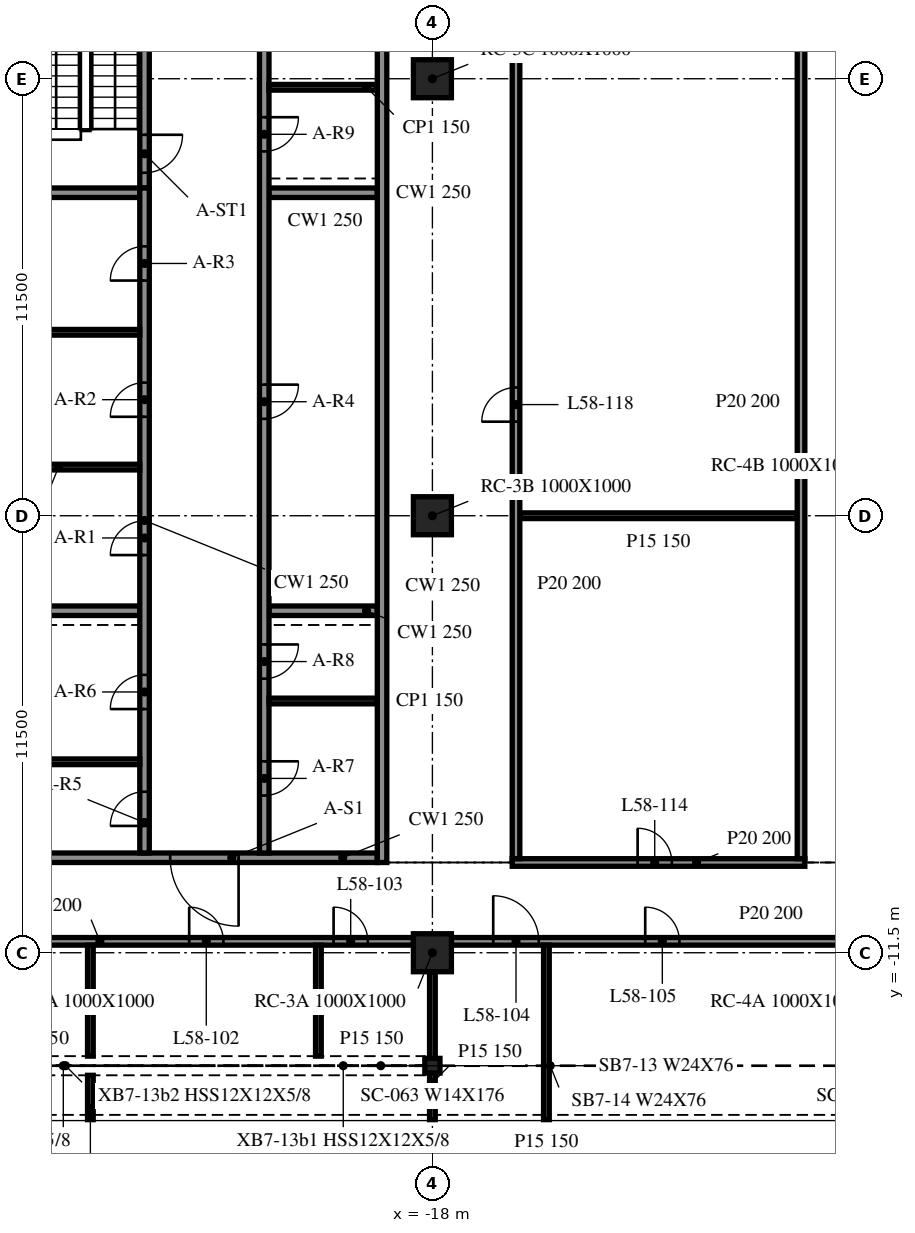
"""IFC4 building model, lengths in metres.
Left out: names, types, materials, properties, quantities, classifications, styles, units other than length and angle.
Written with IfcOpenShell. Run it as: python <this file> out.ifc"""

import sys

from ifc_helpers import new_model, si_unit, direction, frame, frame_2d, origin, origin_2d, place, context, subcontext, project, spatial, rectangle, i_section, extrude, element, fill, save


model = new_model("IFC4")
c1 = context("Model", 3, precision=1e-05, world=origin(), true_north=direction((0.0, 1.0)))
c2 = subcontext(c1, "Body", "Model", "MODEL_VIEW")
j1 = project(units=[si_unit("LENGTHUNIT", "METRE"), si_unit("PLANEANGLEUNIT", "RADIAN")], contexts=[c1])
p1 = place(None, origin())
s1 = spatial("IfcSite", under=j1, at=p1, CompositionType="ELEMENT")
p2 = place(p1, origin())
s2 = spatial("IfcBuilding", under=s1, at=p2, CompositionType="ELEMENT")
p3 = place(p2, frame((0.0, 0.0, 240.0)))
s3 = spatial("IfcBuildingStorey", under=s2, at=p3, CompositionType="ELEMENT", Elevation=240.0)
for number, where, z_axis, x_axis in (
    (1, (-18.0, -11.5, -0.34), (0.0, 0.0, 1.0), (1.0, 0.0, 0.0)),
    (2, (-18.0, 0.0, -0.34), (0.0, 0.0, 1.0), (1.0, 0.0, 0.0)),
    (3, (-18.0, 11.5, -0.34), (0.0, 0.0, 1.0), (1.0, 0.0, 0.0)),
):
    element("IfcColumn", number, at=place(p3, frame(where, z_axis=z_axis, x_axis=x_axis)), inside=s3, PredefinedType="COLUMN", context=c2, shape_type="SweptSolid", body=[
        extrude(rectangle(XDim=1.0, YDim=1.0, at=origin_2d()), origin(), (0.0, 0.0, 1.0), 3.8),
    ])
p4 = place(p3, frame((-18.0, -14.473, -0.34), z_axis=(0.0, 0.0, 1.0), x_axis=(1.0, 0.0, 0.0)))
e4 = element("IfcColumn", 4, at=p4, inside=s3, PredefinedType="COLUMN", context=c2, shape_type="SweptSolid", body=[
    extrude(i_section(OverallWidth=0.399, OverallDepth=0.386, WebThickness=0.021, FlangeThickness=0.033, at=origin_2d()), origin(), (0.0, 0.0, 1.0), 3.8),
])
p5 = place(p3, frame((-19.325, -9.125, 0.0), z_axis=(0.0, 0.0, 1.0), x_axis=(0.0, 1.0, 0.0)))
e5 = element("IfcWall", 5, at=p5, inside=s3, PredefinedType="SOLIDWALL", context=c2, shape_type="SweptSolid", body=[
    extrude(rectangle(XDim=24.25, YDim=0.25, at=frame_2d((12.125, 0.0))), origin(), (0.0, 0.0, 1.0), 3.46),
])
p6 = place(p3, frame((-19.45, -9.0, 0.0), z_axis=(0.0, 0.0, 1.0), x_axis=(-1.0, 0.0, 0.0)))
e6 = element("IfcWall", 6, at=p6, inside=s3, PredefinedType="SOLIDWALL", context=c2, shape_type="SweptSolid", body=[
    extrude(rectangle(XDim=9.1, YDim=0.25, at=frame_2d((4.55, 0.0))), origin(), (0.0, 0.0, 1.0), 3.46),
])
p7 = place(p6, frame((3.65, 0.0, 0.0)))
e7 = element("IfcOpeningElement", 7, at=p7, cuts=e6, PredefinedType="OPENING", context=c2, shape_type="SweptSolid", body=[
    extrude(rectangle(XDim=1.8, YDim=2.1, at=frame_2d((0.9, 1.05))), frame((0.0, 0.135, 0.0), z_axis=(0.0, -1.0, 0.0), x_axis=(1.0, 0.0, 0.0)), (0.0, 0.0, 1.0), 0.27),
])
p8 = place(p3, frame((-25.575, -8.875, 0.0), z_axis=(0.0, 0.0, 1.0), x_axis=(0.0, 1.0, 0.0)))
e8 = element("IfcWall", 8, at=p8, inside=s3, PredefinedType="SOLIDWALL", context=c2, shape_type="SweptSolid", body=[
    extrude(rectangle(XDim=17.5, YDim=0.25, at=frame_2d((8.75, 0.0))), origin(), (0.0, 0.0, 1.0), 3.46),
])
p9 = place(p8, frame((7.84, 0.0, 0.0)))
e9 = element("IfcOpeningElement", 9, at=p9, cuts=e8, PredefinedType="OPENING", context=c2, shape_type="SweptSolid", body=[
    extrude(rectangle(XDim=0.9, YDim=2.1, at=frame_2d((0.45, 1.05))), frame((0.0, 0.135, 0.0), z_axis=(0.0, -1.0, 0.0), x_axis=(1.0, 0.0, 0.0)), (0.0, 0.0, 1.0), 0.27),
])
p10 = place(p8, frame((11.479, 0.0, 0.0)))
e10 = element("IfcOpeningElement", 10, at=p10, cuts=e8, PredefinedType="OPENING", context=c2, shape_type="SweptSolid", body=[
    extrude(rectangle(XDim=0.9, YDim=2.1, at=frame_2d((0.45, 1.05))), frame((0.0, 0.135, 0.0), z_axis=(0.0, -1.0, 0.0), x_axis=(1.0, 0.0, 0.0)), (0.0, 0.0, 1.0), 0.27),
])
p11 = place(p8, frame((15.064, 0.0, 0.0)))
e11 = element("IfcOpeningElement", 11, at=p11, cuts=e8, PredefinedType="OPENING", context=c2, shape_type="SweptSolid", body=[
    extrude(rectangle(XDim=0.9, YDim=2.1, at=frame_2d((0.45, 1.05))), frame((0.0, 0.135, 0.0), z_axis=(0.0, -1.0, 0.0), x_axis=(1.0, 0.0, 0.0)), (0.0, 0.0, 1.0), 0.27),
])
p12 = place(p8, frame((0.712, 0.0, 0.0)))
e12 = element("IfcOpeningElement", 12, at=p12, cuts=e8, PredefinedType="OPENING", context=c2, shape_type="SweptSolid", body=[
    extrude(rectangle(XDim=0.9, YDim=2.1, at=frame_2d((0.45, 1.05))), frame((0.0, 0.135, 0.0), z_axis=(0.0, -1.0, 0.0), x_axis=(1.0, 0.0, 0.0)), (0.0, 0.0, 1.0), 0.27),
])
p13 = place(p8, frame((3.788, 0.0, 0.0)))
e13 = element("IfcOpeningElement", 13, at=p13, cuts=e8, PredefinedType="OPENING", context=c2, shape_type="SweptSolid", body=[
    extrude(rectangle(XDim=0.9, YDim=2.1, at=frame_2d((0.45, 1.05))), frame((0.0, 0.135, 0.0), z_axis=(0.0, -1.0, 0.0), x_axis=(1.0, 0.0, 0.0)), (0.0, 0.0, 1.0), 0.27),
])
p14 = place(p3, frame((-25.575, 14.875, 0.0), z_axis=(0.0, 0.0, 1.0), x_axis=(0.0, -1.0, 0.0)))
e14 = element("IfcWall", 14, at=p14, inside=s3, PredefinedType="SOLIDWALL", context=c2, shape_type="SweptSolid", body=[
    extrude(rectangle(XDim=6.25, YDim=0.25, at=frame_2d((3.125, 0.0))), origin(), (0.0, 0.0, 1.0), 3.46),
])
p15 = place(p14, frame((4.85, 0.0, 0.0)))
e15 = element("IfcOpeningElement", 15, at=p15, cuts=e14, PredefinedType="OPENING", context=c2, shape_type="SweptSolid", body=[
    extrude(rectangle(XDim=1.0, YDim=2.1, at=frame_2d((0.5, 1.05))), frame((0.0, 0.135, 0.0), z_axis=(0.0, -1.0, 0.0), x_axis=(1.0, 0.0, 0.0)), (0.0, 0.0, 1.0), 0.27),
])
p16 = place(p3, frame((-22.425, 14.875, 0.0), z_axis=(0.0, 0.0, 1.0), x_axis=(0.0, -1.0, 0.0)))
e16 = element("IfcWall", 16, at=p16, inside=s3, PredefinedType="SOLIDWALL", context=c2, shape_type="SweptSolid", body=[
    extrude(rectangle(XDim=23.75, YDim=0.25, at=frame_2d((11.875, 0.0))), origin(), (0.0, 0.0, 1.0), 3.46),
])
p17 = place(p16, frame((11.425, 0.0, 0.0)))
e17 = element("IfcOpeningElement", 17, at=p17, cuts=e16, PredefinedType="OPENING", context=c2, shape_type="SweptSolid", body=[
    extrude(rectangle(XDim=0.9, YDim=2.1, at=frame_2d((0.45, 1.05))), frame((0.0, 0.135, 0.0), z_axis=(0.0, -1.0, 0.0), x_axis=(1.0, 0.0, 0.0)), (0.0, 0.0, 1.0), 0.27),
])
p18 = place(p16, frame((21.337, 0.0, 0.0)))
e18 = element("IfcOpeningElement", 18, at=p18, cuts=e16, PredefinedType="OPENING", context=c2, shape_type="SweptSolid", body=[
    extrude(rectangle(XDim=0.9, YDim=2.1, at=frame_2d((0.45, 1.05))), frame((0.0, 0.135, 0.0), z_axis=(0.0, -1.0, 0.0), x_axis=(1.0, 0.0, 0.0)), (0.0, 0.0, 1.0), 0.27),
])
p19 = place(p16, frame((18.262, 0.0, 0.0)))
e19 = element("IfcOpeningElement", 19, at=p19, cuts=e16, PredefinedType="OPENING", context=c2, shape_type="SweptSolid", body=[
    extrude(rectangle(XDim=0.9, YDim=2.1, at=frame_2d((0.45, 1.05))), frame((0.0, 0.135, 0.0), z_axis=(0.0, -1.0, 0.0), x_axis=(1.0, 0.0, 0.0)), (0.0, 0.0, 1.0), 0.27),
])
p20 = place(p16, frame((4.387, 0.0, 0.0)))
e20 = element("IfcOpeningElement", 20, at=p20, cuts=e16, PredefinedType="OPENING", context=c2, shape_type="SweptSolid", body=[
    extrude(rectangle(XDim=0.9, YDim=2.1, at=frame_2d((0.45, 1.05))), frame((0.0, 0.135, 0.0), z_axis=(0.0, -1.0, 0.0), x_axis=(1.0, 0.0, 0.0)), (0.0, 0.0, 1.0), 0.27),
])
p21 = place(p16, frame((1.312, 0.0, 0.0)))
e21 = element("IfcOpeningElement", 21, at=p21, cuts=e16, PredefinedType="OPENING", context=c2, shape_type="SweptSolid", body=[
    extrude(rectangle(XDim=0.9, YDim=2.1, at=frame_2d((0.45, 1.05))), frame((0.0, 0.135, 0.0), z_axis=(0.0, -1.0, 0.0), x_axis=(1.0, 0.0, 0.0)), (0.0, 0.0, 1.0), 0.27),
])
for number, where, z_axis, x_axis in (
    (22, (-28.55, -2.5, 0.0), (0.0, 0.0, 1.0), (1.0, 0.0, 0.0)),
    (23, (-28.55, 8.5, 0.0), (0.0, 0.0, 1.0), (1.0, 0.0, 0.0)),
    (24, (-22.3, -2.5, 0.0), (0.0, 0.0, 1.0), (1.0, 0.0, 0.0)),
    (25, (-22.3, 8.5, 0.0), (0.0, 0.0, 1.0), (1.0, 0.0, 0.0)),
):
    element("IfcWall", number, at=place(p3, frame(where, z_axis=z_axis, x_axis=x_axis)), inside=s3, PredefinedType="SOLIDWALL", context=c2, shape_type="SweptSolid", body=[
        extrude(rectangle(XDim=2.85, YDim=0.25, at=frame_2d((1.425, 0.0))), origin(), (0.0, 0.0, 1.0), 3.46),
    ])
for number, where, z_axis, x_axis in (
    (26, (-28.55, 1.28, 0.0), (0.0, 0.0, 1.0), (1.0, 0.0, 0.0)),
    (27, (-28.55, 4.827, 0.0), (0.0, 0.0, 1.0), (1.0, 0.0, 0.0)),
    (28, (-28.55, -6.475, 0.0), (0.0, 0.0, 1.0), (1.0, 0.0, 0.0)),
    (29, (-22.3, -4.875, 0.0), (0.0, 0.0, 1.0), (1.0, 0.0, 0.0)),
    (30, (-22.3, 11.275, 0.0), (0.0, 0.0, 1.0), (1.0, 0.0, 0.0)),
):
    element("IfcWall", number, at=place(p3, frame(where, z_axis=z_axis, x_axis=x_axis)), inside=s3, PredefinedType="PARTITIONING", context=c2, shape_type="SweptSolid", body=[
        extrude(rectangle(XDim=2.85, YDim=0.15, at=frame_2d((1.425, 0.0))), origin(), (0.0, 0.0, 1.0), 3.46),
    ])
p22 = place(p3, frame((-29.5, -11.2, 0.0), z_axis=(0.0, 0.0, 1.0), x_axis=(1.0, 0.0, 0.0)))
e31 = element("IfcWall", 31, at=p22, inside=s3, PredefinedType="PARTITIONING", context=c2, shape_type="SweptSolid", body=[
    extrude(rectangle(XDim=11.0, YDim=0.2, at=frame_2d((5.5, 0.0))), origin(), (0.0, 0.0, 1.0), 3.46),
])
p23 = place(p22, frame((5.1, 0.0, 0.0)))
e32 = element("IfcOpeningElement", 32, at=p23, cuts=e31, PredefinedType="OPENING", context=c2, shape_type="SweptSolid", body=[
    extrude(rectangle(XDim=0.9, YDim=2.1, at=frame_2d((0.45, 1.05))), frame((0.0, 0.11, 0.0), z_axis=(0.0, -1.0, 0.0), x_axis=(1.0, 0.0, 0.0)), (0.0, 0.0, 1.0), 0.22),
])
p24 = place(p22, frame((8.9, 0.0, 0.0)))
e33 = element("IfcOpeningElement", 33, at=p24, cuts=e31, PredefinedType="OPENING", context=c2, shape_type="SweptSolid", body=[
    extrude(rectangle(XDim=0.9, YDim=2.1, at=frame_2d((0.45, 1.05))), frame((0.0, 0.11, 0.0), z_axis=(0.0, -1.0, 0.0), x_axis=(1.0, 0.0, 0.0)), (0.0, 0.0, 1.0), 0.22),
])
p25 = place(p3, frame((-17.5, -11.2, 0.0), z_axis=(0.0, 0.0, 1.0), x_axis=(1.0, 0.0, 0.0)))
e34 = element("IfcWall", 34, at=p25, inside=s3, PredefinedType="PARTITIONING", context=c2, shape_type="SweptSolid", body=[
    extrude(rectangle(XDim=11.0, YDim=0.2, at=frame_2d((5.5, 0.0))), origin(), (0.0, 0.0, 1.0), 3.46),
])
p26 = place(p25, frame((1.1, 0.0, 0.0)))
e35 = element("IfcOpeningElement", 35, at=p26, cuts=e34, PredefinedType="OPENING", context=c2, shape_type="SweptSolid", body=[
    extrude(rectangle(XDim=1.2, YDim=2.1, at=frame_2d((0.6, 1.05))), frame((0.0, 0.11, 0.0), z_axis=(0.0, -1.0, 0.0), x_axis=(1.0, 0.0, 0.0)), (0.0, 0.0, 1.0), 0.22),
])
p27 = place(p25, frame((5.1, 0.0, 0.0)))
e36 = element("IfcOpeningElement", 36, at=p27, cuts=e34, PredefinedType="OPENING", context=c2, shape_type="SweptSolid", body=[
    extrude(rectangle(XDim=0.9, YDim=2.1, at=frame_2d((0.45, 1.05))), frame((0.0, 0.11, 0.0), z_axis=(0.0, -1.0, 0.0), x_axis=(1.0, 0.0, 0.0)), (0.0, 0.0, 1.0), 0.22),
])
p28 = place(p3, frame((-15.9, -9.125, 0.0), z_axis=(0.0, 0.0, 1.0), x_axis=(1.0, 0.0, 0.0)))
e37 = element("IfcWall", 37, at=p28, inside=s3, PredefinedType="PARTITIONING", context=c2, shape_type="SweptSolid", body=[
    extrude(rectangle(XDim=7.7, YDim=0.2, at=frame_2d((3.85, 0.0))), origin(), (0.0, 0.0, 1.0), 3.46),
])
p29 = place(p28, frame((3.3, 0.0, 0.0)))
e38 = element("IfcOpeningElement", 38, at=p29, cuts=e37, PredefinedType="OPENING", context=c2, shape_type="SweptSolid", body=[
    extrude(rectangle(XDim=0.9, YDim=2.1, at=frame_2d((0.45, 1.05))), frame((0.0, 0.11, 0.0), z_axis=(0.0, -1.0, 0.0), x_axis=(1.0, 0.0, 0.0)), (0.0, 0.0, 1.0), 0.22),
])
p30 = place(p3, frame((-15.7, 0.0, 0.0), z_axis=(0.0, 0.0, 1.0), x_axis=(1.0, 0.0, 0.0)))
e39 = element("IfcWall", 39, at=p30, inside=s3, PredefinedType="PARTITIONING", context=c2, shape_type="SweptSolid", body=[
    extrude(rectangle(XDim=7.3, YDim=0.15, at=frame_2d((3.65, 0.0))), origin(), (0.0, 0.0, 1.0), 3.46),
])
p31 = place(p3, frame((-27.0, -15.892, 0.0), z_axis=(0.0, 0.0, 1.0), x_axis=(0.0, 1.0, 0.0)))
e40 = element("IfcWall", 40, at=p31, inside=s3, PredefinedType="PARTITIONING", context=c2, shape_type="SweptSolid", body=[
    extrude(rectangle(XDim=1.167, YDim=0.15, at=frame_2d((0.583, 0.0))), origin(), (0.0, 0.0, 1.0), 3.46),
])
for number, where, z_axis, x_axis in (
    (41, (-27.0, -14.221, 0.0), (0.0, 0.0, 1.0), (0.0, 1.0, 0.0)),
    (42, (-21.0, -14.221, 0.0), (0.0, 0.0, 1.0), (0.0, 1.0, 0.0)),
):
    element("IfcWall", number, at=place(p3, frame(where, z_axis=z_axis, x_axis=x_axis)), inside=s3, PredefinedType="PARTITIONING", context=c2, shape_type="SweptSolid", body=[
        extrude(rectangle(XDim=2.921, YDim=0.15, at=frame_2d((1.46, 0.0))), origin(), (0.0, 0.0, 1.0), 3.46),
    ])
p32 = place(p3, frame((-18.0, -15.892, 0.0), z_axis=(0.0, 0.0, 1.0), x_axis=(0.0, 1.0, 0.0)))
e43 = element("IfcWall", 43, at=p32, inside=s3, PredefinedType="PARTITIONING", context=c2, shape_type="SweptSolid", body=[
    extrude(rectangle(XDim=3.892, YDim=0.15, at=frame_2d((1.946, 0.0))), origin(), (0.0, 0.0, 1.0), 3.46),
])
p33 = place(p3, frame((-15.8, -9.025, 0.0), z_axis=(0.0, 0.0, 1.0), x_axis=(0.0, 1.0, 0.0)))
e44 = element("IfcWall", 44, at=p33, inside=s3, PredefinedType="PARTITIONING", context=c2, shape_type="SweptSolid", body=[
    extrude(rectangle(XDim=24.05, YDim=0.2, at=frame_2d((12.025, 0.0))), origin(), (0.0, 0.0, 1.0), 3.46),
])
p34 = place(p33, frame((11.5, 0.0, 0.0)))
e45 = element("IfcOpeningElement", 45, at=p34, cuts=e44, PredefinedType="OPENING", context=c2, shape_type="SweptSolid", body=[
    extrude(rectangle(XDim=0.9, YDim=2.1, at=frame_2d((0.45, 1.05))), frame((0.0, 0.11, 0.0), z_axis=(0.0, -1.0, 0.0), x_axis=(1.0, 0.0, 0.0)), (0.0, 0.0, 1.0), 0.22),
])
p35 = place(p3, frame((-15.0, -15.892, 0.0), z_axis=(0.0, 0.0, 1.0), x_axis=(0.0, 1.0, 0.0)))
e46 = element("IfcWall", 46, at=p35, inside=s3, PredefinedType="PARTITIONING", context=c2, shape_type="SweptSolid", body=[
    extrude(rectangle(XDim=4.592, YDim=0.15, at=frame_2d((2.296, 0.0))), origin(), (0.0, 0.0, 1.0), 3.46),
])
p36 = place(p3, frame((-8.3, -9.025, 0.0), z_axis=(0.0, 0.0, 1.0), x_axis=(0.0, 1.0, 0.0)))
e47 = element("IfcWall", 47, at=p36, inside=s3, PredefinedType="PARTITIONING", context=c2, shape_type="SweptSolid", body=[
    extrude(rectangle(XDim=24.05, YDim=0.2, at=frame_2d((12.025, 0.0))), origin(), (0.0, 0.0, 1.0), 3.46),
])
p37 = place(p7, origin())
e48 = element("IfcDoor", 48, at=p37, inside=s3, OperationType="DOUBLE_DOOR_SINGLE_SWING", PredefinedType="DOOR", context=c2, shape_type="SweptSolid", body=[
    extrude(rectangle(XDim=1.8, YDim=2.1, at=frame_2d((0.9, 1.05))), frame((0.0, 0.025, 0.0), z_axis=(0.0, -1.0, 0.0), x_axis=(1.0, 0.0, 0.0)), (0.0, 0.0, 1.0), 0.05),
])
fill(e7, e48)
p38 = place(p9, origin())
e49 = element("IfcDoor", 49, at=p38, inside=s3, OperationType="SINGLE_SWING_LEFT", PredefinedType="DOOR", context=c2, shape_type="SweptSolid", body=[
    extrude(rectangle(XDim=0.9, YDim=2.1, at=frame_2d((0.45, 1.05))), frame((0.0, 0.025, 0.0), z_axis=(0.0, -1.0, 0.0), x_axis=(1.0, 0.0, 0.0)), (0.0, 0.0, 1.0), 0.05),
])
fill(e9, e49)
p39 = place(p10, origin())
e50 = element("IfcDoor", 50, at=p39, inside=s3, OperationType="SINGLE_SWING_RIGHT", PredefinedType="DOOR", context=c2, shape_type="SweptSolid", body=[
    extrude(rectangle(XDim=0.9, YDim=2.1, at=frame_2d((0.45, 1.05))), frame((0.0, 0.025, 0.0), z_axis=(0.0, -1.0, 0.0), x_axis=(1.0, 0.0, 0.0)), (0.0, 0.0, 1.0), 0.05),
])
fill(e10, e50)
p40 = place(p11, origin())
e51 = element("IfcDoor", 51, at=p40, inside=s3, OperationType="SINGLE_SWING_LEFT", PredefinedType="DOOR", context=c2, shape_type="SweptSolid", body=[
    extrude(rectangle(XDim=0.9, YDim=2.1, at=frame_2d((0.45, 1.05))), frame((0.0, 0.025, 0.0), z_axis=(0.0, -1.0, 0.0), x_axis=(1.0, 0.0, 0.0)), (0.0, 0.0, 1.0), 0.05),
])
fill(e11, e51)
p41 = place(p17, origin())
e52 = element("IfcDoor", 52, at=p41, inside=s3, OperationType="SINGLE_SWING_RIGHT", PredefinedType="DOOR", context=c2, shape_type="SweptSolid", body=[
    extrude(rectangle(XDim=0.9, YDim=2.1, at=frame_2d((0.45, 1.05))), frame((0.0, 0.025, 0.0), z_axis=(0.0, -1.0, 0.0), x_axis=(1.0, 0.0, 0.0)), (0.0, 0.0, 1.0), 0.05),
])
fill(e17, e52)
p42 = place(p12, origin())
e53 = element("IfcDoor", 53, at=p42, inside=s3, OperationType="SINGLE_SWING_LEFT", PredefinedType="DOOR", context=c2, shape_type="SweptSolid", body=[
    extrude(rectangle(XDim=0.9, YDim=2.1, at=frame_2d((0.45, 1.05))), frame((0.0, 0.025, 0.0), z_axis=(0.0, -1.0, 0.0), x_axis=(1.0, 0.0, 0.0)), (0.0, 0.0, 1.0), 0.05),
])
fill(e12, e53)
p43 = place(p13, origin())
e54 = element("IfcDoor", 54, at=p43, inside=s3, OperationType="SINGLE_SWING_RIGHT", PredefinedType="DOOR", context=c2, shape_type="SweptSolid", body=[
    extrude(rectangle(XDim=0.9, YDim=2.1, at=frame_2d((0.45, 1.05))), frame((0.0, 0.025, 0.0), z_axis=(0.0, -1.0, 0.0), x_axis=(1.0, 0.0, 0.0)), (0.0, 0.0, 1.0), 0.05),
])
fill(e13, e54)
p44 = place(p18, origin())
e55 = element("IfcDoor", 55, at=p44, inside=s3, OperationType="SINGLE_SWING_LEFT", PredefinedType="DOOR", context=c2, shape_type="SweptSolid", body=[
    extrude(rectangle(XDim=0.9, YDim=2.1, at=frame_2d((0.45, 1.05))), frame((0.0, 0.025, 0.0), z_axis=(0.0, -1.0, 0.0), x_axis=(1.0, 0.0, 0.0)), (0.0, 0.0, 1.0), 0.05),
])
fill(e18, e55)
p45 = place(p19, origin())
e56 = element("IfcDoor", 56, at=p45, inside=s3, OperationType="SINGLE_SWING_RIGHT", PredefinedType="DOOR", context=c2, shape_type="SweptSolid", body=[
    extrude(rectangle(XDim=0.9, YDim=2.1, at=frame_2d((0.45, 1.05))), frame((0.0, 0.025, 0.0), z_axis=(0.0, -1.0, 0.0), x_axis=(1.0, 0.0, 0.0)), (0.0, 0.0, 1.0), 0.05),
])
fill(e19, e56)
p46 = place(p20, origin())
e57 = element("IfcDoor", 57, at=p46, inside=s3, OperationType="SINGLE_SWING_LEFT", PredefinedType="DOOR", context=c2, shape_type="SweptSolid", body=[
    extrude(rectangle(XDim=0.9, YDim=2.1, at=frame_2d((0.45, 1.05))), frame((0.0, 0.025, 0.0), z_axis=(0.0, -1.0, 0.0), x_axis=(1.0, 0.0, 0.0)), (0.0, 0.0, 1.0), 0.05),
])
fill(e20, e57)
p47 = place(p15, origin())
e58 = element("IfcDoor", 58, at=p47, inside=s3, OperationType="SINGLE_SWING_LEFT", PredefinedType="DOOR", context=c2, shape_type="SweptSolid", body=[
    extrude(rectangle(XDim=1.0, YDim=2.1, at=frame_2d((0.5, 1.05))), frame((0.0, 0.025, 0.0), z_axis=(0.0, -1.0, 0.0), x_axis=(1.0, 0.0, 0.0)), (0.0, 0.0, 1.0), 0.05),
])
fill(e15, e58)
p48 = place(p23, origin())
e59 = element("IfcDoor", 59, at=p48, inside=s3, OperationType="SINGLE_SWING_LEFT", PredefinedType="DOOR", context=c2, shape_type="SweptSolid", body=[
    extrude(rectangle(XDim=0.9, YDim=2.1, at=frame_2d((0.45, 1.05))), frame((0.0, 0.025, 0.0), z_axis=(0.0, -1.0, 0.0), x_axis=(1.0, 0.0, 0.0)), (0.0, 0.0, 1.0), 0.05),
])
fill(e32, e59)
p49 = place(p24, origin())
e60 = element("IfcDoor", 60, at=p49, inside=s3, OperationType="SINGLE_SWING_LEFT", PredefinedType="DOOR", context=c2, shape_type="SweptSolid", body=[
    extrude(rectangle(XDim=0.9, YDim=2.1, at=frame_2d((0.45, 1.05))), frame((0.0, 0.025, 0.0), z_axis=(0.0, -1.0, 0.0), x_axis=(1.0, 0.0, 0.0)), (0.0, 0.0, 1.0), 0.05),
])
fill(e33, e60)
p50 = place(p26, origin())
e61 = element("IfcDoor", 61, at=p50, inside=s3, OperationType="SINGLE_SWING_RIGHT", PredefinedType="DOOR", context=c2, shape_type="SweptSolid", body=[
    extrude(rectangle(XDim=1.2, YDim=2.1, at=frame_2d((0.6, 1.05))), frame((0.0, 0.025, 0.0), z_axis=(0.0, -1.0, 0.0), x_axis=(1.0, 0.0, 0.0)), (0.0, 0.0, 1.0), 0.05),
])
fill(e35, e61)
p51 = place(p27, origin())
e62 = element("IfcDoor", 62, at=p51, inside=s3, OperationType="SINGLE_SWING_LEFT", PredefinedType="DOOR", context=c2, shape_type="SweptSolid", body=[
    extrude(rectangle(XDim=0.9, YDim=2.1, at=frame_2d((0.45, 1.05))), frame((0.0, 0.025, 0.0), z_axis=(0.0, -1.0, 0.0), x_axis=(1.0, 0.0, 0.0)), (0.0, 0.0, 1.0), 0.05),
])
fill(e36, e62)
p52 = place(p29, origin())
e63 = element("IfcDoor", 63, at=p52, inside=s3, OperationType="SINGLE_SWING_LEFT", PredefinedType="DOOR", context=c2, shape_type="SweptSolid", body=[
    extrude(rectangle(XDim=0.9, YDim=2.1, at=frame_2d((0.45, 1.05))), frame((0.0, 0.025, 0.0), z_axis=(0.0, -1.0, 0.0), x_axis=(1.0, 0.0, 0.0)), (0.0, 0.0, 1.0), 0.05),
])
fill(e38, e63)
p53 = place(p34, origin())
e64 = element("IfcDoor", 64, at=p53, inside=s3, OperationType="SINGLE_SWING_RIGHT", PredefinedType="DOOR", context=c2, shape_type="SweptSolid", body=[
    extrude(rectangle(XDim=0.9, YDim=2.1, at=frame_2d((0.45, 1.05))), frame((0.0, 0.025, 0.0), z_axis=(0.0, -1.0, 0.0), x_axis=(1.0, 0.0, 0.0)), (0.0, 0.0, 1.0), 0.05),
])
fill(e45, e64)
save(model, sys.argv[1])
